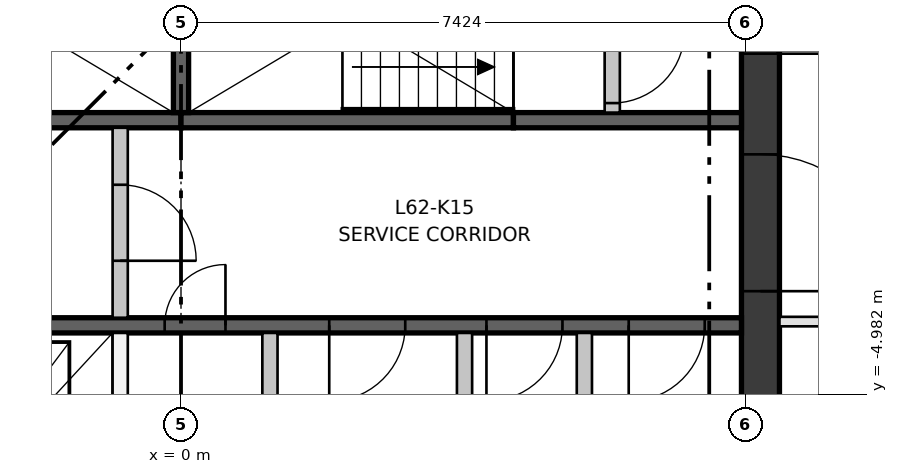
"""IFC4 building model, lengths in metres.
Left out: names, types, materials, properties, quantities, classifications, styles, units other than length and angle.
Written with IfcOpenShell. Run it as: python <this file> out.ifc"""

import sys

from ifc_helpers import new_model, si_unit, direction, frame, frame_2d, origin, place, context, subcontext, project, spatial, rectangle, extrude, element, fill, save


model = new_model("IFC4")
c1 = context("Model", 3, precision=1e-05, world=origin(), true_north=direction((0.0, 1.0)))
c2 = subcontext(c1, "Body", "Model", "MODEL_VIEW")
j1 = project(units=[si_unit("LENGTHUNIT", "METRE"), si_unit("PLANEANGLEUNIT", "RADIAN")], contexts=[c1])
p1 = place(None, origin())
s1 = spatial("IfcSite", under=j1, at=p1, CompositionType="ELEMENT")
p2 = place(p1, origin())
s2 = spatial("IfcBuilding", under=s1, at=p2, CompositionType="ELEMENT")
p3 = place(p2, frame((0.0, 0.0, 227.85)))
s3 = spatial("IfcBuildingStorey", under=s2, at=p3, CompositionType="ELEMENT", Elevation=227.85)
p4 = place(p3, frame((7.624, -7.374, 0.0), z_axis=(0.0, 0.0, 1.0), x_axis=(0.0, 1.0, 0.0)))
e1 = element("IfcWall", 1, at=p4, inside=s3, PredefinedType="SHEAR", context=c2, shape_type="SweptSolid", body=[
    extrude(rectangle(XDim=14.748, YDim=0.5, at=frame_2d((7.374, 0.0))), origin(), (0.0, 0.0, 1.0), 3.35),
])
p5 = place(p4, frame((6.874, 0.0, 0.0)))
e2 = element("IfcOpeningElement", 2, at=p5, cuts=e1, PredefinedType="OPENING", context=c2, shape_type="SweptSolid", body=[
    extrude(rectangle(XDim=1.0, YDim=2.1, at=frame_2d((0.5, 1.05))), frame((0.0, 0.26, 0.0), z_axis=(0.0, -1.0, 0.0), x_axis=(1.0, 0.0, 0.0)), (0.0, 0.0, 1.0), 0.52),
])
p6 = place(p4, frame((3.75, 0.0, 0.0)))
e3 = element("IfcOpeningElement", 3, at=p6, cuts=e1, PredefinedType="OPENING", context=c2, shape_type="SweptSolid", body=[
    extrude(rectangle(XDim=1.8, YDim=2.1, at=frame_2d((0.9, 1.05))), frame((0.0, 0.26, 0.0), z_axis=(0.0, -1.0, 0.0), x_axis=(1.0, 0.0, 0.0)), (0.0, 0.0, 1.0), 0.52),
])
p7 = place(p4, frame((9.198, 0.0, 0.0)))
e4 = element("IfcOpeningElement", 4, at=p7, cuts=e1, PredefinedType="OPENING", context=c2, shape_type="SweptSolid", body=[
    extrude(rectangle(XDim=1.8, YDim=2.1, at=frame_2d((0.9, 1.05))), frame((0.0, 0.26, 0.0), z_axis=(0.0, -1.0, 0.0), x_axis=(1.0, 0.0, 0.0)), (0.0, 0.0, 1.0), 0.52),
])
p8 = place(p3, frame((-7.374, -4.074, 0.0), z_axis=(0.0, 0.0, 1.0), x_axis=(1.0, 0.0, 0.0)))
e5 = element("IfcWall", 5, at=p8, inside=s3, PredefinedType="SHEAR", context=c2, shape_type="SweptSolid", body=[
    extrude(rectangle(XDim=14.748, YDim=0.2, at=frame_2d((7.374, 0.0))), origin(), (0.0, 0.0, 1.0), 3.0),
])
p9 = place(p8, frame((1.319, 0.0, 0.0)))
e6 = element("IfcOpeningElement", 6, at=p9, cuts=e5, PredefinedType="OPENING", context=c2, shape_type="SweptSolid", body=[
    extrude(rectangle(XDim=1.1, YDim=2.1, at=frame_2d((0.55, 1.05))), frame((0.0, 0.11, 0.0), z_axis=(0.0, -1.0, 0.0), x_axis=(1.0, 0.0, 0.0)), (0.0, 0.0, 1.0), 0.22),
])
p10 = place(p8, frame((4.456, 0.0, 0.0)))
e7 = element("IfcOpeningElement", 7, at=p10, cuts=e5, PredefinedType="OPENING", context=c2, shape_type="SweptSolid", body=[
    extrude(rectangle(XDim=1.1, YDim=2.1, at=frame_2d((0.55, 1.05))), frame((0.0, 0.11, 0.0), z_axis=(0.0, -1.0, 0.0), x_axis=(1.0, 0.0, 0.0)), (0.0, 0.0, 1.0), 0.22),
])
p11 = place(p8, frame((7.159, 0.0, 0.0)))
e8 = element("IfcOpeningElement", 8, at=p11, cuts=e5, PredefinedType="OPENING", context=c2, shape_type="SweptSolid", body=[
    extrude(rectangle(XDim=0.8, YDim=2.1, at=frame_2d((0.4, 1.05))), frame((0.0, 0.11, 0.0), z_axis=(0.0, -1.0, 0.0), x_axis=(1.0, 0.0, 0.0)), (0.0, 0.0, 1.0), 0.22),
])
p12 = place(p8, frame((9.324, 0.0, 0.0)))
e9 = element("IfcOpeningElement", 9, at=p12, cuts=e5, PredefinedType="OPENING", context=c2, shape_type="SweptSolid", body=[
    extrude(rectangle(XDim=1.0, YDim=2.1, at=frame_2d((0.5, 1.05))), frame((0.0, 0.11, 0.0), z_axis=(0.0, -1.0, 0.0), x_axis=(1.0, 0.0, 0.0)), (0.0, 0.0, 1.0), 0.22),
])
p13 = place(p8, frame((11.393, 0.0, 0.0)))
e10 = element("IfcOpeningElement", 10, at=p13, cuts=e5, PredefinedType="OPENING", context=c2, shape_type="SweptSolid", body=[
    extrude(rectangle(XDim=1.0, YDim=2.1, at=frame_2d((0.5, 1.05))), frame((0.0, 0.11, 0.0), z_axis=(0.0, -1.0, 0.0), x_axis=(1.0, 0.0, 0.0)), (0.0, 0.0, 1.0), 0.22),
])
p14 = place(p8, frame((13.265, 0.0, 0.0)))
e11 = element("IfcOpeningElement", 11, at=p14, cuts=e5, PredefinedType="OPENING", context=c2, shape_type="SweptSolid", body=[
    extrude(rectangle(XDim=1.0, YDim=2.1, at=frame_2d((0.5, 1.05))), frame((0.0, 0.11, 0.0), z_axis=(0.0, -1.0, 0.0), x_axis=(1.0, 0.0, 0.0)), (0.0, 0.0, 1.0), 0.22),
])
for number, where, z_axis, x_axis in (
    (12, (-4.374, -1.375, 0.0), (0.0, 0.0, 1.0), (1.0, 0.0, 0.0)),
    (13, (0.0, -1.375, 0.0), (0.0, 0.0, 1.0), (1.0, 0.0, 0.0)),
):
    element("IfcWall", number, at=place(p3, frame(where, z_axis=z_axis, x_axis=x_axis)), inside=s3, PredefinedType="SHEAR", context=c2, shape_type="SweptSolid", body=[
        extrude(rectangle(XDim=4.374, YDim=0.2, at=frame_2d((2.187, 0.0))), origin(), (0.0, 0.0, 1.0), 3.0),
    ])
p15 = place(p3, frame((4.374, -1.375, 0.0), z_axis=(0.0, 0.0, 1.0), x_axis=(1.0, 0.0, 0.0)))
e14 = element("IfcWall", 14, at=p15, inside=s3, PredefinedType="SHEAR", context=c2, shape_type="SweptSolid", body=[
    extrude(rectangle(XDim=3.0, YDim=0.2, at=frame_2d((1.5, 0.0))), origin(), (0.0, 0.0, 1.0), 3.0),
])
p16 = place(p3, frame((0.0, -1.275, 0.0), z_axis=(0.0, 0.0, 1.0), x_axis=(0.0, 1.0, 0.0)))
e15 = element("IfcWall", 15, at=p16, inside=s3, PredefinedType="SHEAR", context=c2, shape_type="SweptSolid", body=[
    extrude(rectangle(XDim=2.55, YDim=0.2, at=frame_2d((1.275, 0.0))), origin(), (0.0, 0.0, 1.0), 3.0),
])
p17 = place(p3, frame((-0.8, -7.374, 0.0), z_axis=(0.0, 0.0, 1.0), x_axis=(0.0, 1.0, 0.0)))
e16 = element("IfcWall", 16, at=p17, inside=s3, PredefinedType="PARTITIONING", context=c2, shape_type="SweptSolid", body=[
    extrude(rectangle(XDim=3.2, YDim=0.2, at=frame_2d((1.6, 0.0))), origin(), (0.0, 0.0, 1.0), 3.0),
])
p18 = place(p3, frame((-0.8, -3.974, 0.0), z_axis=(0.0, 0.0, 1.0), x_axis=(0.0, 1.0, 0.0)))
e17 = element("IfcWall", 17, at=p18, inside=s3, PredefinedType="PARTITIONING", context=c2, shape_type="SweptSolid", body=[
    extrude(rectangle(XDim=2.499, YDim=0.2, at=frame_2d((1.25, 0.0))), origin(), (0.0, 0.0, 1.0), 3.0),
])
p19 = place(p18, frame((0.75, 0.0, 0.0)))
e18 = element("IfcOpeningElement", 18, at=p19, cuts=e17, PredefinedType="OPENING", context=c2, shape_type="SweptSolid", body=[
    extrude(rectangle(XDim=1.0, YDim=2.1, at=frame_2d((0.5, 1.05))), frame((0.0, 0.11, 0.0), z_axis=(0.0, -1.0, 0.0), x_axis=(1.0, 0.0, 0.0)), (0.0, 0.0, 1.0), 0.22),
])
for number, where, z_axis, x_axis in (
    (19, (1.17, -7.374, 0.0), (0.0, 0.0, 1.0), (0.0, 1.0, 0.0)),
    (20, (3.73, -7.374, 0.0), (0.0, 0.0, 1.0), (0.0, 1.0, 0.0)),
    (21, (5.307, -7.374, 0.0), (0.0, 0.0, 1.0), (0.0, 1.0, 0.0)),
):
    element("IfcWall", number, at=place(p3, frame(where, z_axis=z_axis, x_axis=x_axis)), inside=s3, PredefinedType="PARTITIONING", context=c2, shape_type="SweptSolid", body=[
        extrude(rectangle(XDim=3.2, YDim=0.2, at=frame_2d((1.6, 0.0))), origin(), (0.0, 0.0, 1.0), 3.0),
    ])
p20 = place(p3, frame((5.674, -1.275, 0.0), z_axis=(0.0, 0.0, 1.0), x_axis=(0.0, 1.0, 0.0)))
e22 = element("IfcWall", 22, at=p20, inside=s3, PredefinedType="PARTITIONING", context=c2, shape_type="SweptSolid", body=[
    extrude(rectangle(XDim=2.55, YDim=0.2, at=frame_2d((1.275, 0.0))), origin(), (0.0, 0.0, 1.0), 3.0),
])
p21 = place(p20, frame((0.125, 0.0, 0.0)))
e23 = element("IfcOpeningElement", 23, at=p21, cuts=e22, PredefinedType="OPENING", context=c2, shape_type="SweptSolid", body=[
    extrude(rectangle(XDim=0.95, YDim=2.1, at=frame_2d((0.475, 1.05))), frame((0.0, 0.11, 0.0), z_axis=(0.0, -1.0, 0.0), x_axis=(1.0, 0.0, 0.0)), (0.0, 0.0, 1.0), 0.22),
])
p22 = place(p20, frame((1.475, 0.0, 0.0)))
e24 = element("IfcOpeningElement", 24, at=p22, cuts=e22, PredefinedType="OPENING", context=c2, shape_type="SweptSolid", body=[
    extrude(rectangle(XDim=0.95, YDim=2.1, at=frame_2d((0.475, 1.05))), frame((0.0, 0.11, 0.0), z_axis=(0.0, -1.0, 0.0), x_axis=(1.0, 0.0, 0.0)), (0.0, 0.0, 1.0), 0.22),
])
p23 = place(p3, frame((10.033, -4.024, 0.0), z_axis=(0.0, 0.0, 1.0), x_axis=(-1.0, 0.0, 0.0)))
e25 = element("IfcWall", 25, at=p23, inside=s3, PredefinedType="PARTITIONING", context=c2, shape_type="SweptSolid", body=[
    extrude(rectangle(XDim=2.159, YDim=0.125, at=frame_2d((1.08, 0.0))), origin(), (0.0, 0.0, 1.0), 3.0),
])
p24 = place(p23, frame((0.6, 0.0, 0.0)))
e26 = element("IfcOpeningElement", 26, at=p24, cuts=e25, PredefinedType="OPENING", context=c2, shape_type="SweptSolid", body=[
    extrude(rectangle(XDim=1.0, YDim=2.1, at=frame_2d((0.5, 1.05))), frame((0.0, 0.073, 0.0), z_axis=(0.0, -1.0, 0.0), x_axis=(1.0, 0.0, 0.0)), (0.0, 0.0, 1.0), 0.145),
])
p25 = place(p21, frame((0.95, 0.0, 0.0), z_axis=(0.0, 0.0, 1.0), x_axis=(-1.0, 0.0, 0.0)))
e27 = element("IfcDoor", 27, at=p25, inside=s3, OperationType="SINGLE_SWING_RIGHT", PredefinedType="DOOR", context=c2, shape_type="SweptSolid", body=[
    extrude(rectangle(XDim=0.95, YDim=2.1, at=frame_2d((0.475, 1.05))), frame((0.0, 0.025, 0.0), z_axis=(0.0, -1.0, 0.0), x_axis=(1.0, 0.0, 0.0)), (0.0, 0.0, 1.0), 0.05),
])
fill(e23, e27)
p26 = place(p19, frame((1.0, 0.0, 0.0), z_axis=(0.0, 0.0, 1.0), x_axis=(-1.0, 0.0, 0.0)))
e28 = element("IfcDoor", 28, at=p26, inside=s3, OperationType="SINGLE_SWING_LEFT", PredefinedType="DOOR", context=c2, shape_type="SweptSolid", body=[
    extrude(rectangle(XDim=1.0, YDim=2.1, at=frame_2d((0.5, 1.05))), frame((0.0, 0.025, 0.0), z_axis=(0.0, -1.0, 0.0), x_axis=(1.0, 0.0, 0.0)), (0.0, 0.0, 1.0), 0.05),
])
fill(e18, e28)
p27 = place(p11, origin())
e29 = element("IfcDoor", 29, at=p27, inside=s3, OperationType="SINGLE_SWING_RIGHT", PredefinedType="DOOR", context=c2, shape_type="SweptSolid", body=[
    extrude(rectangle(XDim=0.8, YDim=2.1, at=frame_2d((0.4, 1.05))), frame((0.0, 0.025, 0.0), z_axis=(0.0, -1.0, 0.0), x_axis=(1.0, 0.0, 0.0)), (0.0, 0.0, 1.0), 0.05),
])
fill(e8, e29)
p28 = place(p12, frame((1.0, 0.0, 0.0), z_axis=(0.0, 0.0, 1.0), x_axis=(-1.0, 0.0, 0.0)))
e30 = element("IfcDoor", 30, at=p28, inside=s3, OperationType="SINGLE_SWING_LEFT", PredefinedType="DOOR", context=c2, shape_type="SweptSolid", body=[
    extrude(rectangle(XDim=1.0, YDim=2.1, at=frame_2d((0.5, 1.05))), frame((0.0, 0.025, 0.0), z_axis=(0.0, -1.0, 0.0), x_axis=(1.0, 0.0, 0.0)), (0.0, 0.0, 1.0), 0.05),
])
fill(e9, e30)
p29 = place(p13, frame((1.0, 0.0, 0.0), z_axis=(0.0, 0.0, 1.0), x_axis=(-1.0, 0.0, 0.0)))
e31 = element("IfcDoor", 31, at=p29, inside=s3, OperationType="SINGLE_SWING_LEFT", PredefinedType="DOOR", context=c2, shape_type="SweptSolid", body=[
    extrude(rectangle(XDim=1.0, YDim=2.1, at=frame_2d((0.5, 1.05))), frame((0.0, 0.025, 0.0), z_axis=(0.0, -1.0, 0.0), x_axis=(1.0, 0.0, 0.0)), (0.0, 0.0, 1.0), 0.05),
])
fill(e10, e31)
p30 = place(p14, frame((1.0, 0.0, 0.0), z_axis=(0.0, 0.0, 1.0), x_axis=(-1.0, 0.0, 0.0)))
e32 = element("IfcDoor", 32, at=p30, inside=s3, OperationType="SINGLE_SWING_LEFT", PredefinedType="DOOR", context=c2, shape_type="SweptSolid", body=[
    extrude(rectangle(XDim=1.0, YDim=2.1, at=frame_2d((0.5, 1.05))), frame((0.0, 0.025, 0.0), z_axis=(0.0, -1.0, 0.0), x_axis=(1.0, 0.0, 0.0)), (0.0, 0.0, 1.0), 0.05),
])
fill(e11, e32)
p31 = place(p5, frame((1.0, 0.0, 0.0), z_axis=(0.0, 0.0, 1.0), x_axis=(-1.0, 0.0, 0.0)))
e33 = element("IfcDoor", 33, at=p31, inside=s3, OperationType="SINGLE_SWING_LEFT", PredefinedType="DOOR", context=c2, shape_type="SweptSolid", body=[
    extrude(rectangle(XDim=1.0, YDim=2.1, at=frame_2d((0.5, 1.05))), frame((0.0, 0.25, 0.0), z_axis=(0.0, -1.0, 0.0), x_axis=(1.0, 0.0, 0.0)), (0.0, 0.0, 1.0), 0.05),
])
fill(e2, e33)
p32 = place(p6, frame((1.8, 0.0, 0.0), z_axis=(0.0, 0.0, 1.0), x_axis=(-1.0, 0.0, 0.0)))
e34 = element("IfcDoor", 34, at=p32, inside=s3, OperationType="DOUBLE_DOOR_SINGLE_SWING", PredefinedType="DOOR", context=c2, shape_type="SweptSolid", body=[
    extrude(rectangle(XDim=1.8, YDim=2.1, at=frame_2d((0.9, 1.05))), frame((0.0, 0.025, 0.0), z_axis=(0.0, -1.0, 0.0), x_axis=(1.0, 0.0, 0.0)), (0.0, 0.0, 1.0), 0.05),
])
fill(e3, e34)
save(model, sys.argv[1])
